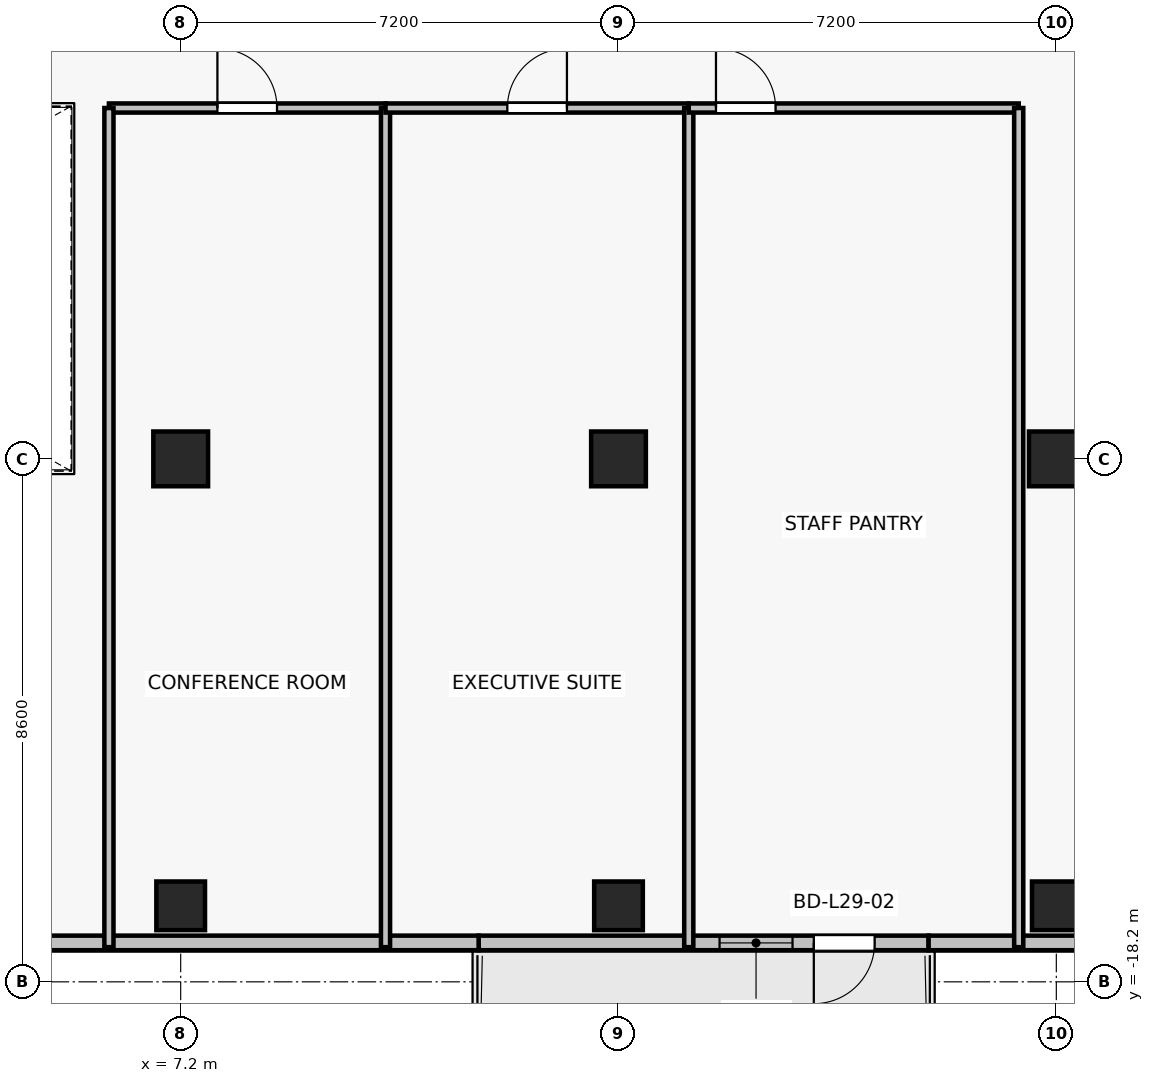
"""IFC4 building model, lengths in metres.
Left out: names, types, materials, properties, quantities, classifications, styles, units other than length and angle.
Written with IfcOpenShell. Run it as: python <this file> out.ifc"""

import sys

from ifc_helpers import new_model, si_unit, direction, frame, frame_2d, origin, origin_2d, place, context, subcontext, project, spatial, rectangle, extrude, source, transform, mapped, element, fill, save


model = new_model("IFC4")
c1 = context("Model", 3, precision=1e-05, world=origin(), true_north=direction((0.0, 1.0)))
c2 = subcontext(c1, "Body", "Model", "MODEL_VIEW")
j1 = project(units=[si_unit("LENGTHUNIT", "METRE"), si_unit("PLANEANGLEUNIT", "RADIAN")], contexts=[c1])
p1 = place(None, origin())
s1 = spatial("IfcSite", under=j1, at=p1, CompositionType="ELEMENT")
p2 = place(p1, origin())
s2 = spatial("IfcBuilding", under=s1, at=p2, CompositionType="ELEMENT")
p3 = place(p2, frame((0.0, 0.0, 106.6)))
s3 = spatial("IfcBuildingStorey", under=s2, at=p3, CompositionType="ELEMENT", Elevation=106.6)
for number, where, z_axis, x_axis in (
    (1, (7.2, -9.6, 0.0), (0.0, 0.0, 1.0), (1.0, 0.0, 0.0)),
    (2, (14.4, -9.6, 0.0), (0.0, 0.0, 1.0), (1.0, 0.0, 0.0)),
    (3, (21.6, -9.6, 0.0), (0.0, 0.0, 1.0), (1.0, 0.0, 0.0)),
):
    element("IfcColumn", number, at=place(p3, frame(where, z_axis=z_axis, x_axis=x_axis)), inside=s3, PredefinedType="COLUMN", context=c2, shape_type="SweptSolid", body=[
        extrude(rectangle(XDim=0.9, YDim=0.9, at=origin_2d()), origin(), (0.0, 0.0, 1.0), 3.3),
    ])
for number, where, z_axis, x_axis in (
    (4, (7.2, -16.95, 0.0), (0.0, 0.0, 1.0), (1.0, 0.0, 0.0)),
    (5, (14.4, -16.95, 0.0), (0.0, 0.0, 1.0), (1.0, 0.0, 0.0)),
    (6, (21.6, -16.95, 0.0), (0.0, 0.0, 1.0), (1.0, 0.0, 0.0)),
):
    element("IfcColumn", number, at=place(p3, frame(where, z_axis=z_axis, x_axis=x_axis)), inside=s3, PredefinedType="COLUMN", context=c2, shape_type="SweptSolid", body=[
        extrude(rectangle(XDim=0.8, YDim=0.8, at=origin_2d()), origin(), (0.0, 0.0, 1.0), 3.3),
    ])
p4 = place(p3, frame((19.5, -17.56, 0.0), z_axis=(0.0, 0.0, 1.0), x_axis=(-1.0, 0.0, 0.0)))
e7 = element("IfcWall", 7, at=p4, inside=s3, PredefinedType="SOLIDWALL", context=c2, shape_type="SweptSolid", body=[
    extrude(rectangle(XDim=7.4, YDim=0.24, at=frame_2d((3.7, 0.0))), origin(), (0.0, 0.0, 1.0), 2.665),
])
p5 = place(p4, frame((0.888, 0.0, 0.0)))
e8 = element("IfcOpeningElement", 8, at=p5, cuts=e7, PredefinedType="OPENING", context=c2, shape_type="SweptSolid", body=[
    extrude(rectangle(XDim=1.0, YDim=2.2, at=frame_2d((0.5, 1.1))), frame((0.0, 0.13, 0.0), z_axis=(0.0, -1.0, 0.0), x_axis=(1.0, 0.0, 0.0)), (0.0, 0.0, 1.0), 0.26),
])
p6 = place(p4, frame((2.238, 0.0, 0.85)))
e9 = element("IfcOpeningElement", 9, at=p6, cuts=e7, PredefinedType="OPENING", context=c2, shape_type="SweptSolid", body=[
    extrude(rectangle(XDim=1.2, YDim=1.5, at=frame_2d((0.6, 0.75))), frame((0.0, 0.13, 0.0), z_axis=(0.0, -1.0, 0.0), x_axis=(1.0, 0.0, 0.0)), (0.0, 0.0, 1.0), 0.26),
])
p7 = place(p3, frame((19.5, -17.56, 0.0), z_axis=(0.0, 0.0, 1.0), x_axis=(1.0, 0.0, 0.0)))
e10 = element("IfcWall", 10, at=p7, inside=s3, PredefinedType="SOLIDWALL", context=c2, shape_type="SweptSolid", body=[
    extrude(rectangle(XDim=2.96, YDim=0.24, at=frame_2d((1.48, 0.0))), origin(), (0.0, 0.0, 1.0), 2.665),
])
p8 = place(p3, frame((3.34, -17.56, 0.0), z_axis=(0.0, 0.0, 1.0), x_axis=(1.0, 0.0, 0.0)))
e11 = element("IfcWall", 11, at=p8, inside=s3, PredefinedType="SOLIDWALL", context=c2, shape_type="SweptSolid", body=[
    extrude(rectangle(XDim=8.76, YDim=0.24, at=frame_2d((4.38, 0.0))), origin(), (0.0, 0.0, 1.0), 3.075),
])
p9 = place(p3, frame((6.02, -3.83, 0.0), z_axis=(0.0, 0.0, 1.0), x_axis=(1.0, 0.0, 0.0)))
e12 = element("IfcWall", 12, at=p9, inside=s3, PredefinedType="PARTITIONING", context=c2, shape_type="SweptSolid", body=[
    extrude(rectangle(XDim=4.548, YDim=0.15, at=frame_2d((2.274, 0.0))), origin(), (0.0, 0.0, 1.0), 2.515),
])
p10 = place(p9, frame((1.784, 0.0, 0.0)))
e13 = element("IfcOpeningElement", 13, at=p10, cuts=e12, PredefinedType="OPENING", context=c2, shape_type="SweptSolid", body=[
    extrude(rectangle(XDim=0.98, YDim=2.15, at=frame_2d((0.49, 1.075))), frame((0.0, 0.085, 0.0), z_axis=(0.0, -1.0, 0.0), x_axis=(1.0, 0.0, 0.0)), (0.0, 0.0, 1.0), 0.17),
])
for number, where, z_axis, x_axis in (
    (14, (6.02, -17.63, 0.0), (0.0, 0.0, 1.0), (0.0, 1.0, 0.0)),
    (15, (10.568, -3.83, 0.0), (0.0, 0.0, 1.0), (0.0, -1.0, 0.0)),
):
    element("IfcWall", number, at=place(p3, frame(where, z_axis=z_axis, x_axis=x_axis)), inside=s3, PredefinedType="PARTITIONING", context=c2, shape_type="SweptSolid", body=[
        extrude(rectangle(XDim=13.8, YDim=0.15, at=frame_2d((6.9, 0.0))), origin(), (0.0, 0.0, 1.0), 2.515),
    ])
p11 = place(p3, frame((10.568, -3.83, 0.0), z_axis=(0.0, 0.0, 1.0), x_axis=(1.0, 0.0, 0.0)))
e16 = element("IfcWall", 16, at=p11, inside=s3, PredefinedType="PARTITIONING", context=c2, shape_type="SweptSolid", body=[
    extrude(rectangle(XDim=4.987, YDim=0.15, at=frame_2d((2.494, 0.0))), origin(), (0.0, 0.0, 1.0), 2.515),
])
p12 = place(p11, frame((2.004, 0.0, 0.0)))
e17 = element("IfcOpeningElement", 17, at=p12, cuts=e16, PredefinedType="OPENING", context=c2, shape_type="SweptSolid", body=[
    extrude(rectangle(XDim=0.98, YDim=2.15, at=frame_2d((0.49, 1.075))), frame((0.0, 0.085, 0.0), z_axis=(0.0, -1.0, 0.0), x_axis=(1.0, 0.0, 0.0)), (0.0, 0.0, 1.0), 0.17),
])
p13 = place(p3, frame((15.556, -3.83, 0.0), z_axis=(0.0, 0.0, 1.0), x_axis=(0.0, -1.0, 0.0)))
e18 = element("IfcWall", 18, at=p13, inside=s3, PredefinedType="PARTITIONING", context=c2, shape_type="SweptSolid", body=[
    extrude(rectangle(XDim=13.8, YDim=0.15, at=frame_2d((6.9, 0.0))), origin(), (0.0, 0.0, 1.0), 2.515),
])
p14 = place(p3, frame((15.556, -3.83, 0.0), z_axis=(0.0, 0.0, 1.0), x_axis=(1.0, 0.0, 0.0)))
e19 = element("IfcWall", 19, at=p14, inside=s3, PredefinedType="PARTITIONING", context=c2, shape_type="SweptSolid", body=[
    extrude(rectangle(XDim=5.426, YDim=0.15, at=frame_2d((2.713, 0.0))), origin(), (0.0, 0.0, 1.0), 3.075),
])
p15 = place(p14, frame((0.448, 0.0, 0.0)))
e20 = element("IfcOpeningElement", 20, at=p15, cuts=e19, PredefinedType="OPENING", context=c2, shape_type="SweptSolid", body=[
    extrude(rectangle(XDim=0.98, YDim=2.15, at=frame_2d((0.49, 1.075))), frame((0.0, 0.085, 0.0), z_axis=(0.0, -1.0, 0.0), x_axis=(1.0, 0.0, 0.0)), (0.0, 0.0, 1.0), 0.17),
])
p16 = place(p3, frame((20.982, -3.83, 0.0), z_axis=(0.0, 0.0, 1.0), x_axis=(0.0, -1.0, 0.0)))
e21 = element("IfcWall", 21, at=p16, inside=s3, PredefinedType="PARTITIONING", context=c2, shape_type="SweptSolid", body=[
    extrude(rectangle(XDim=13.8, YDim=0.15, at=frame_2d((6.9, 0.0))), origin(), (0.0, 0.0, 1.0), 2.515),
])
m1 = source(origin(), c2, "Body", "SweptSolid", [
    extrude(rectangle(XDim=1.0, YDim=2.2, at=frame_2d((0.5, 1.1))), frame((0.0, 0.025, 0.0), z_axis=(0.0, -1.0, 0.0), x_axis=(1.0, 0.0, 0.0)), (0.0, 0.0, 1.0), 0.05),
])
p17 = place(p5, origin())
e22 = element("IfcDoor", 22, at=p17, inside=s3, OperationType="SINGLE_SWING_RIGHT", PredefinedType="DOOR", context=c2, shape_type="MappedRepresentation", body=[
    mapped(m1, transform((0.0, 0.0, 0.0), x_axis=(1.0, 0.0, 0.0), y_axis=(0.0, 1.0, 0.0), z_axis=(0.0, 0.0, 1.0), scale=1.0)),
])
fill(e8, e22)
m2 = source(origin(), c2, "Body", "SweptSolid", [
    extrude(rectangle(XDim=1.2, YDim=1.5, at=frame_2d((0.6, 0.75))), frame((0.0, 0.03, 0.0), z_axis=(0.0, -1.0, 0.0), x_axis=(1.0, 0.0, 0.0)), (0.0, 0.0, 1.0), 0.06),
])
p18 = place(p6, origin())
e23 = element("IfcWindow", 23, at=p18, inside=s3, PartitioningType="SINGLE_PANEL", PredefinedType="WINDOW", context=c2, shape_type="MappedRepresentation", body=[
    mapped(m2, transform((0.0, 0.0, 0.0), x_axis=(1.0, 0.0, 0.0), y_axis=(0.0, 1.0, 0.0), z_axis=(0.0, 0.0, 1.0), scale=1.0)),
])
fill(e9, e23)
m3 = source(origin(), c2, "Body", "SweptSolid", [
    extrude(rectangle(XDim=0.98, YDim=2.15, at=frame_2d((0.49, 1.075))), frame((0.0, 0.025, 0.0), z_axis=(0.0, -1.0, 0.0), x_axis=(1.0, 0.0, 0.0)), (0.0, 0.0, 1.0), 0.05),
])
p19 = place(p10, origin())
e24 = element("IfcDoor", 24, at=p19, inside=s3, OperationType="SINGLE_SWING_LEFT", PredefinedType="DOOR", context=c2, shape_type="MappedRepresentation", body=[
    mapped(m3, transform((0.0, 0.0, 0.0), x_axis=(1.0, 0.0, 0.0), y_axis=(0.0, 1.0, 0.0), z_axis=(0.0, 0.0, 1.0), scale=1.0)),
])
fill(e13, e24)
p20 = place(p12, origin())
e25 = element("IfcDoor", 25, at=p20, inside=s3, OperationType="SINGLE_SWING_RIGHT", PredefinedType="DOOR", context=c2, shape_type="MappedRepresentation", body=[
    mapped(m3, transform((0.0, 0.0, 0.0), x_axis=(1.0, 0.0, 0.0), y_axis=(0.0, 1.0, 0.0), z_axis=(0.0, 0.0, 1.0), scale=1.0)),
])
fill(e17, e25)
p21 = place(p15, origin())
e26 = element("IfcDoor", 26, at=p21, inside=s3, OperationType="SINGLE_SWING_LEFT", PredefinedType="DOOR", context=c2, shape_type="MappedRepresentation", body=[
    mapped(m3, transform((0.0, 0.0, 0.0), x_axis=(1.0, 0.0, 0.0), y_axis=(0.0, 1.0, 0.0), z_axis=(0.0, 0.0, 1.0), scale=1.0)),
])
fill(e20, e26)
save(model, sys.argv[1])
